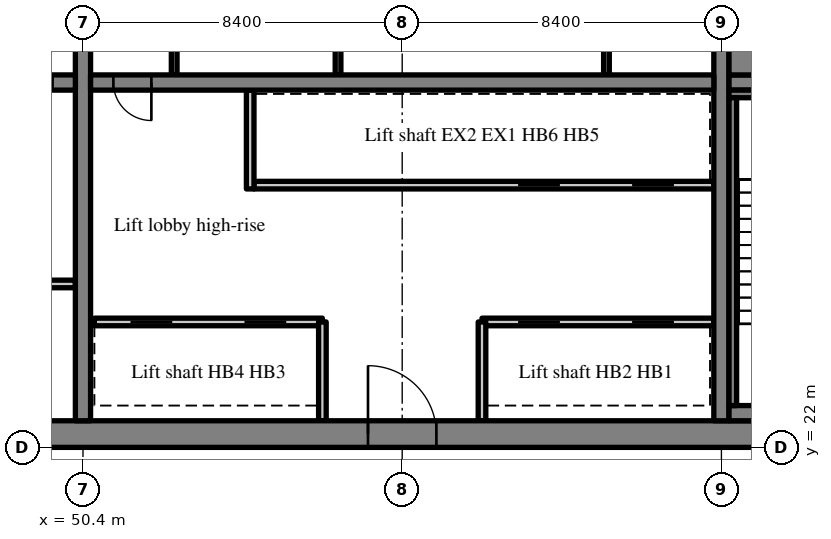
"""IFC4 building model, lengths in metres.
Left out: names, types, materials, properties, quantities, classifications, styles, units other than length and angle.
Written with IfcOpenShell. Run it as: python <this file> out.ifc"""

import sys

from ifc_helpers import new_model, si_unit, direction, frame, frame_2d, origin, place, context, subcontext, project, spatial, rectangle, extrude, source, transform, mapped, element, fill, save


model = new_model("IFC4")
c1 = context("Model", 3, precision=1e-05, world=origin(), true_north=direction((0.0, 1.0)))
c2 = subcontext(c1, "Body", "Model", "MODEL_VIEW")
j1 = project(units=[si_unit("LENGTHUNIT", "METRE"), si_unit("PLANEANGLEUNIT", "RADIAN")], contexts=[c1])
p1 = place(None, origin())
s1 = spatial("IfcSite", under=j1, at=p1, CompositionType="ELEMENT")
p2 = place(p1, origin())
s2 = spatial("IfcBuilding", under=s1, at=p2, CompositionType="ELEMENT")
p3 = place(p2, frame((0.0, 0.0, 166.8)))
s3 = spatial("IfcBuildingStorey", under=s2, at=p3, CompositionType="ELEMENT", Elevation=166.8)
m1 = source(origin(), c2, "Body", "SweptSolid", [
    extrude(rectangle(XDim=50.4, YDim=0.7, at=frame_2d((25.2, 0.0))), origin(), (0.0, 0.0, 1.0), 3.52),
])
p4 = place(p3, frame((25.2, 22.35, 0.0), z_axis=(0.0, 0.0, 1.0), x_axis=(1.0, 0.0, 0.0)))
e1 = element("IfcWall", 1, at=p4, inside=s3, PredefinedType="SHEAR", context=c2, shape_type="MappedRepresentation", body=[
    mapped(m1, transform((0.0, 0.0, 0.0), scale=1.0)),
])
m2 = source(origin(), c2, "Body", "SweptSolid", [
    extrude(rectangle(XDim=1.8, YDim=2.1, at=frame_2d((0.9, 1.05))), frame((0.0, 0.36, 0.0), z_axis=(0.0, -1.0, 0.0), x_axis=(1.0, 0.0, 0.0)), (0.0, 0.0, 1.0), 0.72),
])
p5 = place(p4, frame((15.9, 0.0, 0.0)))
e2 = element("IfcOpeningElement", 2, at=p5, cuts=e1, PredefinedType="OPENING", context=c2, shape_type="MappedRepresentation", body=[
    mapped(m2, transform((0.0, 0.0, 0.0), scale=1.0)),
])
m3 = source(origin(), c2, "Body", "SweptSolid", [
    extrude(rectangle(XDim=0.9, YDim=2.1, at=frame_2d((0.45, 1.05))), frame((0.0, 0.36, 0.0), z_axis=(0.0, -1.0, 0.0), x_axis=(1.0, 0.0, 0.0)), (0.0, 0.0, 1.0), 0.72),
])
p6 = place(p4, frame((9.7, 0.0, 0.0)))
e3 = element("IfcOpeningElement", 3, at=p6, cuts=e1, PredefinedType="OPENING", context=c2, shape_type="MappedRepresentation", body=[
    mapped(m3, transform((0.0, 0.0, 0.0), scale=1.0)),
])
p7 = place(p4, frame((21.5, 0.0, 0.0)))
e4 = element("IfcOpeningElement", 4, at=p7, cuts=e1, PredefinedType="OPENING", context=c2, shape_type="MappedRepresentation", body=[
    mapped(m3, transform((0.0, 0.0, 0.0), scale=1.0)),
])
p8 = place(p4, frame((32.7, 0.0, 0.0)))
e5 = element("IfcOpeningElement", 5, at=p8, cuts=e1, PredefinedType="OPENING", context=c2, shape_type="MappedRepresentation", body=[
    mapped(m2, transform((0.0, 0.0, 0.0), scale=1.0)),
])
m4 = source(origin(), c2, "Body", "SweptSolid", [
    extrude(rectangle(XDim=1.2, YDim=2.1, at=frame_2d((0.6, 1.05))), frame((0.0, 0.36, 0.0), z_axis=(0.0, -1.0, 0.0), x_axis=(1.0, 0.0, 0.0)), (0.0, 0.0, 1.0), 0.72),
])
p9 = place(p4, frame((6.475, 0.0, 0.0)))
e6 = element("IfcOpeningElement", 6, at=p9, cuts=e1, PredefinedType="OPENING", context=c2, shape_type="MappedRepresentation", body=[
    mapped(m4, transform((0.0, 0.0, 0.0), scale=1.0)),
])
p10 = place(p4, frame((47.875, 0.0, 0.0)))
e7 = element("IfcOpeningElement", 7, at=p10, cuts=e1, PredefinedType="OPENING", context=c2, shape_type="MappedRepresentation", body=[
    mapped(m4, transform((0.0, 0.0, 0.0), scale=1.0)),
])
m5 = source(origin(), c2, "Body", "SweptSolid", [
    extrude(rectangle(XDim=18.6, YDim=0.4, at=frame_2d((9.3, 0.0))), origin(), (0.0, 0.0, 1.0), 3.52),
])
p11 = place(p3, frame((50.4, 22.7, 0.0), z_axis=(0.0, 0.0, 1.0), x_axis=(0.0, 1.0, 0.0)))
e8 = element("IfcWall", 8, at=p11, inside=s3, PredefinedType="SHEAR", context=c2, shape_type="MappedRepresentation", body=[
    mapped(m5, transform((0.0, 0.0, 0.0), scale=1.0)),
])
m6 = source(origin(), c2, "Body", "SweptSolid", [
    extrude(rectangle(XDim=1.1, YDim=2.1, at=frame_2d((0.55, 1.05))), frame((0.0, 0.21, 0.0), z_axis=(0.0, -1.0, 0.0), x_axis=(1.0, 0.0, 0.0)), (0.0, 0.0, 1.0), 0.42),
])
p12 = place(p11, frame((12.75, 0.0, 0.0)))
e9 = element("IfcOpeningElement", 9, at=p12, cuts=e8, PredefinedType="OPENING", context=c2, shape_type="MappedRepresentation", body=[
    mapped(m6, transform((0.0, 0.0, 0.0), scale=1.0)),
])
p13 = place(p3, frame((67.2, 22.7, 0.0), z_axis=(0.0, 0.0, 1.0), x_axis=(0.0, 1.0, 0.0)))
e10 = element("IfcWall", 10, at=p13, inside=s3, PredefinedType="SHEAR", context=c2, shape_type="MappedRepresentation", body=[
    mapped(m5, transform((0.0, 0.0, 0.0), scale=1.0)),
])
m7 = source(origin(), c2, "Body", "SweptSolid", [
    extrude(rectangle(XDim=16.4, YDim=0.4, at=frame_2d((8.2, 0.0))), origin(), (0.0, 0.0, 1.0), 3.52),
])
p14 = place(p3, frame((33.8, 31.6, 0.0), z_axis=(0.0, 0.0, 1.0), x_axis=(1.0, 0.0, 0.0)))
e11 = element("IfcWall", 11, at=p14, inside=s3, PredefinedType="SHEAR", context=c2, shape_type="MappedRepresentation", body=[
    mapped(m7, transform((0.0, 0.0, 0.0), scale=1.0)),
])
m8 = source(origin(), c2, "Body", "SweptSolid", [
    extrude(rectangle(XDim=1.0, YDim=2.1, at=frame_2d((0.5, 1.05))), frame((0.0, 0.21, 0.0), z_axis=(0.0, -1.0, 0.0), x_axis=(1.0, 0.0, 0.0)), (0.0, 0.0, 1.0), 0.42),
])
p15 = place(p14, frame((14.8, 0.0, 0.0)))
e12 = element("IfcOpeningElement", 12, at=p15, cuts=e11, PredefinedType="OPENING", context=c2, shape_type="MappedRepresentation", body=[
    mapped(m8, transform((0.0, 0.0, 0.0), scale=1.0)),
])
p16 = place(p3, frame((50.6, 31.6, 0.0), z_axis=(0.0, 0.0, 1.0), x_axis=(1.0, 0.0, 0.0)))
e13 = element("IfcWall", 13, at=p16, inside=s3, PredefinedType="SHEAR", context=c2, shape_type="MappedRepresentation", body=[
    mapped(m7, transform((0.0, 0.0, 0.0), scale=1.0)),
])
p17 = place(p16, frame((0.6, 0.0, 0.0)))
e14 = element("IfcOpeningElement", 14, at=p17, cuts=e13, PredefinedType="OPENING", context=c2, shape_type="MappedRepresentation", body=[
    mapped(m8, transform((0.0, 0.0, 0.0), scale=1.0)),
])
m9 = source(origin(), c2, "Body", "SweptSolid", [
    extrude(rectangle(XDim=7.5, YDim=0.4, at=frame_2d((3.75, 0.0))), origin(), (0.0, 0.0, 1.0), 3.52),
])
p18 = place(p3, frame((67.4, 31.6, 0.0), z_axis=(0.0, 0.0, 1.0), x_axis=(1.0, 0.0, 0.0)))
e15 = element("IfcWall", 15, at=p18, inside=s3, PredefinedType="SHEAR", context=c2, shape_type="MappedRepresentation", body=[
    mapped(m9, transform((0.0, 0.0, 0.0), scale=1.0)),
])
p19 = place(p18, frame((5.725, 0.0, 0.0)))
e16 = element("IfcOpeningElement", 16, at=p19, cuts=e15, PredefinedType="OPENING", context=c2, shape_type="MappedRepresentation", body=[
    mapped(m6, transform((0.0, 0.0, 0.0), scale=1.0)),
])
m10 = source(origin(), c2, "Body", "SweptSolid", [
    extrude(rectangle(XDim=6.1, YDim=0.2, at=frame_2d((3.05, 0.0))), origin(), (0.0, 0.0, 1.0), 3.52),
])
p20 = place(p3, frame((44.1, 26.3, 0.0), z_axis=(0.0, 0.0, 1.0), x_axis=(1.0, 0.0, 0.0)))
e17 = element("IfcWall", 17, at=p20, inside=s3, PredefinedType="PARTITIONING", context=c2, shape_type="MappedRepresentation", body=[
    mapped(m10, transform((0.0, 0.0, 0.0), scale=1.0)),
])
m11 = source(origin(), c2, "Body", "SweptSolid", [
    extrude(rectangle(XDim=6.1, YDim=0.2, at=frame_2d((3.05, 0.0))), origin(), (0.0, 0.0, 1.0), 3.52),
])
p21 = place(p3, frame((67.0, 25.3, 0.0), z_axis=(0.0, 0.0, 1.0), x_axis=(-1.0, 0.0, 0.0)))
e18 = element("IfcWall", 18, at=p21, inside=s3, PredefinedType="SOLIDWALL", context=c2, shape_type="MappedRepresentation", body=[
    mapped(m11, transform((0.0, 0.0, 0.0), scale=1.0)),
])
m12 = source(origin(), c2, "Body", "SweptSolid", [
    extrude(rectangle(XDim=1.1, YDim=2.1, at=frame_2d((0.55, 1.05))), frame((0.0, 0.11, 0.0), z_axis=(0.0, -1.0, 0.0), x_axis=(1.0, 0.0, 0.0)), (0.0, 0.0, 1.0), 0.22),
])
p22 = place(p21, frame((1.05, 0.0, 0.0)))
e19 = element("IfcOpeningElement", 19, at=p22, cuts=e18, PredefinedType="OPENING", context=c2, shape_type="MappedRepresentation", body=[
    mapped(m12, transform((0.0, 0.0, 0.0), scale=1.0)),
])
p23 = place(p21, frame((4.05, 0.0, 0.0)))
e20 = element("IfcOpeningElement", 20, at=p23, cuts=e18, PredefinedType="OPENING", context=c2, shape_type="MappedRepresentation", body=[
    mapped(m12, transform((0.0, 0.0, 0.0), scale=1.0)),
])
m13 = source(origin(), c2, "Body", "SweptSolid", [
    extrude(rectangle(XDim=6.0, YDim=0.2, at=frame_2d((3.0, 0.0))), origin(), (0.0, 0.0, 1.0), 3.52),
])
p24 = place(p3, frame((56.7, 25.3, 0.0), z_axis=(0.0, 0.0, 1.0), x_axis=(-1.0, 0.0, 0.0)))
e21 = element("IfcWall", 21, at=p24, inside=s3, PredefinedType="SOLIDWALL", context=c2, shape_type="MappedRepresentation", body=[
    mapped(m13, transform((0.0, 0.0, 0.0), scale=1.0)),
])
p25 = place(p24, frame((0.95, 0.0, 0.0)))
e22 = element("IfcOpeningElement", 22, at=p25, cuts=e21, PredefinedType="OPENING", context=c2, shape_type="MappedRepresentation", body=[
    mapped(m12, transform((0.0, 0.0, 0.0), scale=1.0)),
])
p26 = place(p24, frame((3.95, 0.0, 0.0)))
e23 = element("IfcOpeningElement", 23, at=p26, cuts=e21, PredefinedType="OPENING", context=c2, shape_type="MappedRepresentation", body=[
    mapped(m12, transform((0.0, 0.0, 0.0), scale=1.0)),
])
m14 = source(origin(), c2, "Body", "SweptSolid", [
    extrude(rectangle(XDim=12.1, YDim=0.2, at=frame_2d((6.05, 0.0))), origin(), (0.0, 0.0, 1.0), 3.52),
])
p27 = place(p3, frame((67.0, 28.9, 0.0), z_axis=(0.0, 0.0, 1.0), x_axis=(-1.0, 0.0, 0.0)))
e24 = element("IfcWall", 24, at=p27, inside=s3, PredefinedType="SOLIDWALL", context=c2, shape_type="MappedRepresentation", body=[
    mapped(m14, transform((0.0, 0.0, 0.0), scale=1.0)),
])
p28 = place(p27, frame((1.05, 0.0, 0.0)))
e25 = element("IfcOpeningElement", 25, at=p28, cuts=e24, PredefinedType="OPENING", context=c2, shape_type="MappedRepresentation", body=[
    mapped(m12, transform((0.0, 0.0, 0.0), scale=1.0)),
])
p29 = place(p27, frame((4.05, 0.0, 0.0)))
e26 = element("IfcOpeningElement", 26, at=p29, cuts=e24, PredefinedType="OPENING", context=c2, shape_type="MappedRepresentation", body=[
    mapped(m12, transform((0.0, 0.0, 0.0), scale=1.0)),
])
m15 = source(origin(), c2, "Body", "SweptSolid", [
    extrude(rectangle(XDim=2.6, YDim=0.2, at=frame_2d((1.3, 0.0))), origin(), (0.0, 0.0, 1.0), 3.52),
])
for number, where, z_axis, x_axis in (
    (27, (60.9, 22.7, 0.0), (0.0, 0.0, 1.0), (0.0, 1.0, 0.0)),
    (28, (56.7, 22.7, 0.0), (0.0, 0.0, 1.0), (0.0, 1.0, 0.0)),
):
    element("IfcWall", number, at=place(p3, frame(where, z_axis=z_axis, x_axis=x_axis)), inside=s3, PredefinedType="SOLIDWALL", context=c2, shape_type="MappedRepresentation", body=[
        mapped(m15, transform((0.0, 0.0, 0.0), scale=1.0)),
    ])
m16 = source(origin(), c2, "Body", "SweptSolid", [
    extrude(rectangle(XDim=2.6, YDim=0.2, at=frame_2d((1.3, 0.0))), origin(), (0.0, 0.0, 1.0), 3.52),
])
p30 = place(p3, frame((54.8, 28.8, 0.0), z_axis=(0.0, 0.0, 1.0), x_axis=(0.0, 1.0, 0.0)))
e29 = element("IfcWall", 29, at=p30, inside=s3, PredefinedType="SOLIDWALL", context=c2, shape_type="MappedRepresentation", body=[
    mapped(m16, transform((0.0, 0.0, 0.0), scale=1.0)),
])
m17 = source(origin(), c2, "Body", "SweptSolid", [
    extrude(rectangle(XDim=3.2, YDim=0.15, at=frame_2d((1.6, 0.0))), origin(), (0.0, 0.0, 1.0), 3.52),
])
for number, where, z_axis, x_axis in (
    (30, (52.8, 31.8, 0.0), (0.0, 0.0, 1.0), (0.0, 1.0, 0.0)),
    (31, (64.175, 31.8, 0.0), (0.0, 0.0, 1.0), (0.0, 1.0, 0.0)),
    (32, (57.112, 31.8, 0.0), (0.0, 0.0, 1.0), (0.0, 1.0, 0.0)),
):
    element("IfcWall", number, at=place(p3, frame(where, z_axis=z_axis, x_axis=x_axis)), inside=s3, PredefinedType="PARTITIONING", context=c2, shape_type="MappedRepresentation", body=[
        mapped(m17, transform((0.0, 0.0, 0.0), scale=1.0)),
    ])
m18 = source(origin(), c2, "Body", "SweptSolid", [
    extrude(rectangle(XDim=4.85, YDim=0.4, at=frame_2d((2.425, 0.0))), origin(), (0.0, 0.0, 1.0), 3.52),
])
p31 = place(p3, frame((67.4, 22.9, 0.0), z_axis=(0.0, 0.0, 1.0), x_axis=(1.0, 0.0, 0.0)))
e33 = element("IfcWall", 33, at=p31, inside=s3, PredefinedType="SOLIDWALL", context=c2, shape_type="MappedRepresentation", body=[
    mapped(m18, transform((0.0, 0.0, 0.0), scale=1.0)),
])
m19 = source(origin(), c2, "Body", "SweptSolid", [
    extrude(rectangle(XDim=4.85, YDim=0.2, at=frame_2d((2.425, 0.0))), origin(), (0.0, 0.0, 1.0), 3.52),
])
p32 = place(p3, frame((67.4, 31.3, 0.0), z_axis=(0.0, 0.0, 1.0), x_axis=(1.0, 0.0, 0.0)))
e34 = element("IfcWall", 34, at=p32, inside=s3, PredefinedType="SOLIDWALL", context=c2, shape_type="MappedRepresentation", body=[
    mapped(m19, transform((0.0, 0.0, 0.0), scale=1.0)),
])
m20 = source(origin(), c2, "Body", "SweptSolid", [
    extrude(rectangle(XDim=8.1, YDim=0.2, at=frame_2d((4.05, 0.0))), origin(), (0.0, 0.0, 1.0), 3.52),
])
p33 = place(p3, frame((67.5, 23.1, 0.0), z_axis=(0.0, 0.0, 1.0), x_axis=(0.0, 1.0, 0.0)))
e35 = element("IfcWall", 35, at=p33, inside=s3, PredefinedType="SOLIDWALL", context=c2, shape_type="MappedRepresentation", body=[
    mapped(m20, transform((0.0, 0.0, 0.0), scale=1.0)),
])
m21 = source(origin(), c2, "Body", "SweptSolid", [
    extrude(rectangle(XDim=4.85, YDim=1.0, at=frame_2d((2.425, 0.0))), origin(), (0.0, 0.0, 1.0), 3.52),
])
p34 = place(p3, frame((67.4, 32.3, 0.0), z_axis=(0.0, 0.0, 1.0), x_axis=(1.0, 0.0, 0.0)))
e36 = element("IfcWall", 36, at=p34, inside=s3, PredefinedType="SOLIDWALL", context=c2, shape_type="MappedRepresentation", body=[
    mapped(m21, transform((0.0, 0.0, 0.0), scale=1.0)),
])
m22 = source(origin(), c2, "Body", "SweptSolid", [
    extrude(rectangle(XDim=1.8, YDim=2.1, at=frame_2d((0.9, 1.05))), frame((0.0, 0.275, 0.0), z_axis=(0.0, -1.0, 0.0), x_axis=(1.0, 0.0, 0.0)), (0.0, 0.0, 1.0), 0.05),
])
p35 = place(p8, origin())
e37 = element("IfcDoor", 37, at=p35, inside=s3, OperationType="DOUBLE_DOOR_SINGLE_SWING", PredefinedType="DOOR", context=c2, shape_type="MappedRepresentation", body=[
    mapped(m22, transform((0.0, 0.0, 0.0), scale=1.0)),
])
fill(e5, e37)
m23 = source(origin(), c2, "Body", "SweptSolid", [
    extrude(rectangle(XDim=1.0, YDim=2.1, at=frame_2d((0.5, 1.05))), frame((0.0, 0.025, 0.0), z_axis=(0.0, -1.0, 0.0), x_axis=(1.0, 0.0, 0.0)), (0.0, 0.0, 1.0), 0.05),
])
p36 = place(p17, origin())
e38 = element("IfcDoor", 38, at=p36, inside=s3, OperationType="SINGLE_SWING_RIGHT", PredefinedType="DOOR", context=c2, shape_type="MappedRepresentation", body=[
    mapped(m23, transform((0.0, 0.0, 0.0), scale=1.0)),
])
fill(e14, e38)
m24 = source(origin(), c2, "Body", "SweptSolid", [
    extrude(rectangle(XDim=1.1, YDim=2.1, at=frame_2d((0.55, 1.05))), frame((0.0, 0.025, 0.0), z_axis=(0.0, -1.0, 0.0), x_axis=(1.0, 0.0, 0.0)), (0.0, 0.0, 1.0), 0.05),
])
p37 = place(p22, origin())
e39 = element("IfcDoor", 39, at=p37, inside=s3, OperationType="SLIDING_TO_RIGHT", PredefinedType="DOOR", context=c2, shape_type="MappedRepresentation", body=[
    mapped(m24, transform((0.0, 0.0, 0.0), scale=1.0)),
])
fill(e19, e39)
p38 = place(p23, origin())
e40 = element("IfcDoor", 40, at=p38, inside=s3, OperationType="SLIDING_TO_LEFT", PredefinedType="DOOR", context=c2, shape_type="MappedRepresentation", body=[
    mapped(m24, transform((0.0, 0.0, 0.0), scale=1.0)),
])
fill(e20, e40)
p39 = place(p25, origin())
e41 = element("IfcDoor", 41, at=p39, inside=s3, OperationType="SLIDING_TO_RIGHT", PredefinedType="DOOR", context=c2, shape_type="MappedRepresentation", body=[
    mapped(m24, transform((0.0, 0.0, 0.0), scale=1.0)),
])
fill(e22, e41)
p40 = place(p26, origin())
e42 = element("IfcDoor", 42, at=p40, inside=s3, OperationType="SLIDING_TO_LEFT", PredefinedType="DOOR", context=c2, shape_type="MappedRepresentation", body=[
    mapped(m24, transform((0.0, 0.0, 0.0), scale=1.0)),
])
fill(e23, e42)
p41 = place(p28, origin())
e43 = element("IfcDoor", 43, at=p41, inside=s3, OperationType="SLIDING_TO_RIGHT", PredefinedType="DOOR", context=c2, shape_type="MappedRepresentation", body=[
    mapped(m24, transform((0.0, 0.0, 0.0), scale=1.0)),
])
fill(e25, e43)
p42 = place(p29, origin())
e44 = element("IfcDoor", 44, at=p42, inside=s3, OperationType="SLIDING_TO_LEFT", PredefinedType="DOOR", context=c2, shape_type="MappedRepresentation", body=[
    mapped(m24, transform((0.0, 0.0, 0.0), scale=1.0)),
])
fill(e26, e44)
save(model, sys.argv[1])
